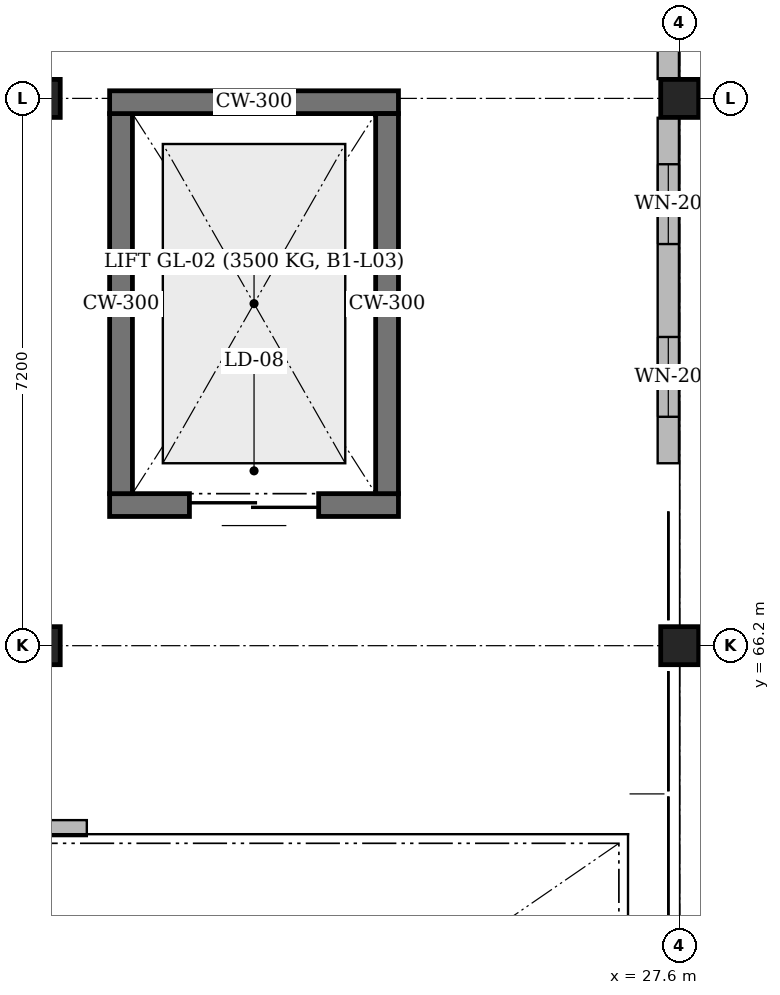
"""IFC4 building model, lengths in metres.
Left out: names, types, materials, properties, quantities, classifications, styles, units other than length and angle.
Written with IfcOpenShell. Run it as: python <this file> out.ifc"""

import sys

from ifc_helpers import new_model, si_unit, direction, frame, frame_2d, origin, origin_2d, place, context, subcontext, project, spatial, rectangle, extrude, element, fill, save


model = new_model("IFC4")
c1 = context("Model", 3, precision=1e-05, world=origin(), true_north=direction((0.0, 1.0)))
c2 = subcontext(c1, "Body", "Model", "MODEL_VIEW")
j1 = project(units=[si_unit("LENGTHUNIT", "METRE"), si_unit("PLANEANGLEUNIT", "RADIAN")], contexts=[c1])
p1 = place(None, origin())
s1 = spatial("IfcSite", under=j1, at=p1, CompositionType="ELEMENT")
p2 = place(p1, origin())
s2 = spatial("IfcBuilding", under=s1, at=p2, CompositionType="ELEMENT")
p3 = place(p2, frame((0.0, 0.0, 13.2)))
s3 = spatial("IfcBuildingStorey", under=s2, at=p3, CompositionType="ELEMENT", Elevation=13.2)
for number, where, z_axis, x_axis in (
    (1, (19.2, 66.2, 0.0), (0.0, 0.0, 1.0), (1.0, 0.0, 0.0)),
    (2, (19.2, 73.4, 0.0), (0.0, 0.0, 1.0), (1.0, 0.0, 0.0)),
    (3, (27.6, 66.2, 0.0), (0.0, 0.0, 1.0), (1.0, 0.0, 0.0)),
    (4, (27.6, 73.4, 0.0), (0.0, 0.0, 1.0), (1.0, 0.0, 0.0)),
):
    element("IfcColumn", number, at=place(p3, frame(where, z_axis=z_axis, x_axis=x_axis)), inside=s3, PredefinedType="COLUMN", context=c2, shape_type="SweptSolid", body=[
        extrude(rectangle(XDim=0.5, YDim=0.5, at=origin_2d()), origin(), (0.0, 0.0, 1.0), 3.71),
    ])
p4 = place(p3, frame((23.9, 68.05, 0.0), z_axis=(0.0, 0.0, 1.0), x_axis=(-1.0, 0.0, 0.0)))
e5 = element("IfcWall", 5, at=p4, inside=s3, PredefinedType="SOLIDWALL", context=c2, shape_type="SweptSolid", body=[
    extrude(rectangle(XDim=3.8, YDim=0.3, at=frame_2d((1.9, 0.0))), origin(), (0.0, 0.0, 1.0), 3.6),
])
p5 = place(p4, frame((1.05, 0.0, 0.0)))
e6 = element("IfcOpeningElement", 6, at=p5, cuts=e5, PredefinedType="OPENING", context=c2, shape_type="SweptSolid", body=[
    extrude(rectangle(XDim=1.7, YDim=2.4, at=frame_2d((0.85, 1.2))), frame((0.0, 0.17, 0.0), z_axis=(0.0, -1.0, 0.0), x_axis=(1.0, 0.0, 0.0)), (0.0, 0.0, 1.0), 0.34),
])
p6 = place(p3, frame((20.25, 68.2, 0.0), z_axis=(0.0, 0.0, 1.0), x_axis=(0.0, 1.0, 0.0)))
e7 = element("IfcWall", 7, at=p6, inside=s3, PredefinedType="SOLIDWALL", context=c2, shape_type="SweptSolid", body=[
    extrude(rectangle(XDim=5.0, YDim=0.3, at=frame_2d((2.5, 0.0))), origin(), (0.0, 0.0, 1.0), 3.6),
])
p7 = place(p3, frame((20.1, 73.35, 0.0), z_axis=(0.0, 0.0, 1.0), x_axis=(1.0, 0.0, 0.0)))
e8 = element("IfcWall", 8, at=p7, inside=s3, PredefinedType="SOLIDWALL", context=c2, shape_type="SweptSolid", body=[
    extrude(rectangle(XDim=3.8, YDim=0.3, at=frame_2d((1.9, 0.0))), origin(), (0.0, 0.0, 1.0), 3.6),
])
p8 = place(p3, frame((23.75, 73.2, 0.0), z_axis=(0.0, 0.0, 1.0), x_axis=(0.0, -1.0, 0.0)))
e9 = element("IfcWall", 9, at=p8, inside=s3, PredefinedType="SOLIDWALL", context=c2, shape_type="SweptSolid", body=[
    extrude(rectangle(XDim=5.0, YDim=0.3, at=frame_2d((2.5, 0.0))), origin(), (0.0, 0.0, 1.0), 3.6),
])
p9 = place(p3, frame((27.45, 68.6, 0.0), z_axis=(0.0, 0.0, 1.0), x_axis=(0.0, 1.0, 0.0)))
e10 = element("IfcWall", 10, at=p9, inside=s3, PredefinedType="SOLIDWALL", context=c2, shape_type="SweptSolid", body=[
    extrude(rectangle(XDim=4.545, YDim=0.28, at=frame_2d((2.272, 0.0))), origin(), (0.0, 0.0, 1.0), 3.373),
])
p10 = place(p9, frame((0.611, 0.0, 0.95)))
e11 = element("IfcOpeningElement", 11, at=p10, cuts=e10, PredefinedType="OPENING", context=c2, shape_type="SweptSolid", body=[
    extrude(rectangle(XDim=1.05, YDim=1.85, at=frame_2d((0.525, 0.925))), frame((0.0, 0.16, 0.0), z_axis=(0.0, -1.0, 0.0), x_axis=(1.0, 0.0, 0.0)), (0.0, 0.0, 1.0), 0.32),
])
p11 = place(p9, frame((2.884, 0.0, 0.95)))
e12 = element("IfcOpeningElement", 12, at=p11, cuts=e10, PredefinedType="OPENING", context=c2, shape_type="SweptSolid", body=[
    extrude(rectangle(XDim=1.05, YDim=1.85, at=frame_2d((0.525, 0.925))), frame((0.0, 0.16, 0.0), z_axis=(0.0, -1.0, 0.0), x_axis=(1.0, 0.0, 0.0)), (0.0, 0.0, 1.0), 0.32),
])
p12 = place(p3, frame((27.45, 73.655, 0.0), z_axis=(0.0, 0.0, 1.0), x_axis=(0.0, 1.0, 0.0)))
e13 = element("IfcWall", 13, at=p12, inside=s3, PredefinedType="SOLIDWALL", context=c2, shape_type="SweptSolid", body=[
    extrude(rectangle(XDim=6.69, YDim=0.28, at=frame_2d((3.345, 0.0))), origin(), (0.0, 0.0, 1.0), 3.373),
])
p13 = place(p12, frame((0.938, 0.0, 0.95)))
e14 = element("IfcOpeningElement", 14, at=p13, cuts=e13, PredefinedType="OPENING", context=c2, shape_type="SweptSolid", body=[
    extrude(rectangle(XDim=1.47, YDim=1.7, at=frame_2d((0.735, 0.85))), frame((0.0, 0.16, 0.0), z_axis=(0.0, -1.0, 0.0), x_axis=(1.0, 0.0, 0.0)), (0.0, 0.0, 1.0), 0.32),
])
p14 = place(p12, frame((4.282, 0.0, 0.95)))
e15 = element("IfcOpeningElement", 15, at=p14, cuts=e13, PredefinedType="OPENING", context=c2, shape_type="SweptSolid", body=[
    extrude(rectangle(XDim=1.47, YDim=1.7, at=frame_2d((0.735, 0.85))), frame((0.0, 0.16, 0.0), z_axis=(0.0, -1.0, 0.0), x_axis=(1.0, 0.0, 0.0)), (0.0, 0.0, 1.0), 0.32),
])
p15 = place(p3, frame((10.6, 63.8, 0.0), z_axis=(0.0, 0.0, 1.0), x_axis=(1.0, 0.0, 0.0)))
e16 = element("IfcWall", 16, at=p15, inside=s3, PredefinedType="PARTITIONING", context=c2, shape_type="SweptSolid", body=[
    extrude(rectangle(XDim=9.2, YDim=0.21, at=frame_2d((4.6, 0.0))), origin(), (0.0, 0.0, 1.0), 3.66),
])
p16 = place(p5, origin())
e17 = element("IfcDoor", 17, at=p16, inside=s3, OperationType="DOUBLE_DOOR_SLIDING", PredefinedType="DOOR", context=c2, shape_type="SweptSolid", body=[
    extrude(rectangle(XDim=1.7, YDim=2.4, at=frame_2d((0.85, 1.2))), frame((0.0, 0.025, 0.0), z_axis=(0.0, -1.0, 0.0), x_axis=(1.0, 0.0, 0.0)), (0.0, 0.0, 1.0), 0.05),
])
fill(e6, e17)
p17 = place(p10, origin())
e18 = element("IfcWindow", 18, at=p17, inside=s3, PartitioningType="SINGLE_PANEL", PredefinedType="WINDOW", context=c2, shape_type="SweptSolid", body=[
    extrude(rectangle(XDim=1.05, YDim=1.85, at=frame_2d((0.525, 0.925))), frame((0.0, 0.03, 0.0), z_axis=(0.0, -1.0, 0.0), x_axis=(1.0, 0.0, 0.0)), (0.0, 0.0, 1.0), 0.06),
])
fill(e11, e18)
p18 = place(p11, origin())
e19 = element("IfcWindow", 19, at=p18, inside=s3, PartitioningType="SINGLE_PANEL", PredefinedType="WINDOW", context=c2, shape_type="SweptSolid", body=[
    extrude(rectangle(XDim=1.05, YDim=1.85, at=frame_2d((0.525, 0.925))), frame((0.0, 0.03, 0.0), z_axis=(0.0, -1.0, 0.0), x_axis=(1.0, 0.0, 0.0)), (0.0, 0.0, 1.0), 0.06),
])
fill(e12, e19)
save(model, sys.argv[1])
